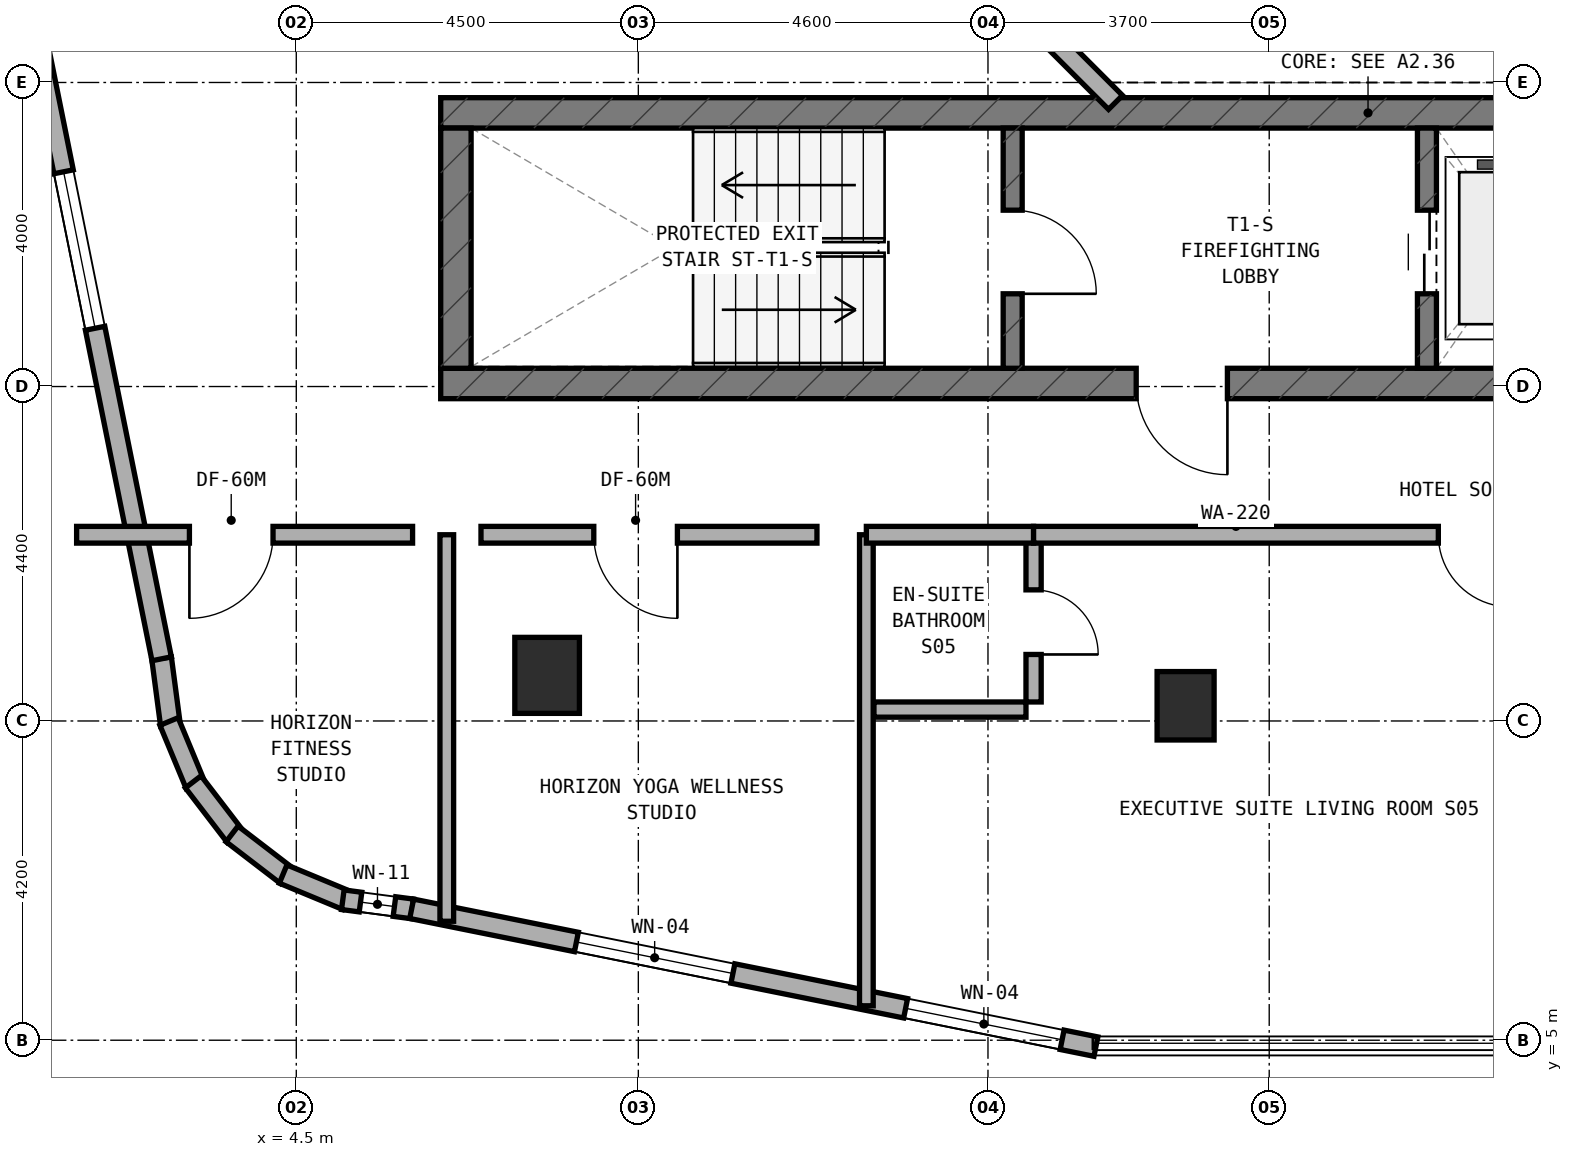
"""IFC4 building model, lengths in metres.
Left out: names, types, materials, properties, quantities, classifications, styles, units other than length and angle.
Written with IfcOpenShell. Run it as: python <this file> out.ifc"""

import sys

from ifc_helpers import new_model, si_unit, direction, frame, frame_2d, origin, origin_2d, place, context, subcontext, project, spatial, rectangle, extrude, element, fill, save


model = new_model("IFC4")
c1 = context("Model", 3, precision=1e-05, world=origin(), true_north=direction((0.0, 1.0)))
c2 = subcontext(c1, "Body", "Model", "MODEL_VIEW")
j1 = project(units=[si_unit("LENGTHUNIT", "METRE"), si_unit("PLANEANGLEUNIT", "RADIAN")], contexts=[c1])
p1 = place(None, origin())
s1 = spatial("IfcSite", under=j1, at=p1, CompositionType="ELEMENT")
p2 = place(p1, origin())
s2 = spatial("IfcBuilding", under=s1, at=p2, CompositionType="ELEMENT")
p3 = place(p2, frame((0.0, 0.0, 159.0)))
s3 = spatial("IfcBuildingStorey", under=s2, at=p3, CompositionType="ELEMENT", Elevation=159.0)
p4 = place(p3, frame((6.4, 13.64, 0.0), z_axis=(0.0, 0.0, 1.0), x_axis=(1.0, 0.0, 0.0)))
e1 = element("IfcWall", 1, at=p4, inside=s3, PredefinedType="SHEAR", context=c2, shape_type="SweptSolid", body=[
    extrude(rectangle(XDim=24.4, YDim=0.4, at=frame_2d((12.2, 0.0))), origin(), (0.0, 0.0, 1.0), 3.5),
])
p5 = place(p4, frame((9.15, 0.0, 0.0)))
e2 = element("IfcOpeningElement", 2, at=p5, cuts=e1, PredefinedType="OPENING", context=c2, shape_type="SweptSolid", body=[
    extrude(rectangle(XDim=1.2, YDim=2.15, at=frame_2d((0.6, 1.075))), frame((0.0, 0.21, 0.0), z_axis=(0.0, -1.0, 0.0), x_axis=(1.0, 0.0, 0.0)), (0.0, 0.0, 1.0), 0.42),
])
p6 = place(p4, frame((16.94, 0.0, 0.0)))
e3 = element("IfcOpeningElement", 3, at=p6, cuts=e1, PredefinedType="OPENING", context=c2, shape_type="SweptSolid", body=[
    extrude(rectangle(XDim=0.85, YDim=2.1, at=frame_2d((0.425, 1.05))), frame((0.0, 0.21, 0.0), z_axis=(0.0, -1.0, 0.0), x_axis=(1.0, 0.0, 0.0)), (0.0, 0.0, 1.0), 0.42),
])
p7 = place(p4, frame((18.783, 0.0, 0.0)))
e4 = element("IfcOpeningElement", 4, at=p7, cuts=e1, PredefinedType="OPENING", context=c2, shape_type="SweptSolid", body=[
    extrude(rectangle(XDim=1.1, YDim=2.15, at=frame_2d((0.55, 1.075))), frame((0.0, 0.21, 0.0), z_axis=(0.0, -1.0, 0.0), x_axis=(1.0, 0.0, 0.0)), (0.0, 0.0, 1.0), 0.42),
])
p8 = place(p4, frame((20.65, 0.0, 0.0)))
e5 = element("IfcOpeningElement", 5, at=p8, cuts=e1, PredefinedType="OPENING", context=c2, shape_type="SweptSolid", body=[
    extrude(rectangle(XDim=1.1, YDim=2.15, at=frame_2d((0.55, 1.075))), frame((0.0, 0.21, 0.0), z_axis=(0.0, -1.0, 0.0), x_axis=(1.0, 0.0, 0.0)), (0.0, 0.0, 1.0), 0.42),
])
p9 = place(p4, frame((22.517, 0.0, 0.0)))
e6 = element("IfcOpeningElement", 6, at=p9, cuts=e1, PredefinedType="OPENING", context=c2, shape_type="SweptSolid", body=[
    extrude(rectangle(XDim=1.1, YDim=2.15, at=frame_2d((0.55, 1.075))), frame((0.0, 0.21, 0.0), z_axis=(0.0, -1.0, 0.0), x_axis=(1.0, 0.0, 0.0)), (0.0, 0.0, 1.0), 0.42),
])
p10 = place(p3, frame((6.4, 17.2, 0.0), z_axis=(0.0, 0.0, 1.0), x_axis=(1.0, 0.0, 0.0)))
e7 = element("IfcWall", 7, at=p10, inside=s3, PredefinedType="SHEAR", context=c2, shape_type="SweptSolid", body=[
    extrude(rectangle(XDim=24.4, YDim=0.4, at=frame_2d((12.2, 0.0))), origin(), (0.0, 0.0, 1.0), 3.5),
])
p11 = place(p3, frame((6.6, 13.84, 0.0), z_axis=(0.0, 0.0, 1.0), x_axis=(0.0, 1.0, 0.0)))
e8 = element("IfcWall", 8, at=p11, inside=s3, PredefinedType="SHEAR", context=c2, shape_type="SweptSolid", body=[
    extrude(rectangle(XDim=3.16, YDim=0.4, at=frame_2d((1.58, 0.0))), origin(), (0.0, 0.0, 1.0), 3.5),
])
p12 = place(p3, frame((13.925, 13.84, 0.0), z_axis=(0.0, 0.0, 1.0), x_axis=(0.0, 1.0, 0.0)))
e9 = element("IfcWall", 9, at=p12, inside=s3, PredefinedType="STANDARD", context=c2, shape_type="SweptSolid", body=[
    extrude(rectangle(XDim=3.16, YDim=0.25, at=frame_2d((1.58, 0.0))), origin(), (0.0, 0.0, 1.0), 3.22),
])
p13 = place(p12, frame((0.98, 0.0, 0.0)))
e10 = element("IfcOpeningElement", 10, at=p13, cuts=e9, PredefinedType="OPENING", context=c2, shape_type="SweptSolid", body=[
    extrude(rectangle(XDim=1.1, YDim=2.15, at=frame_2d((0.55, 1.075))), frame((0.0, 0.135, 0.0), z_axis=(0.0, -1.0, 0.0), x_axis=(1.0, 0.0, 0.0)), (0.0, 0.0, 1.0), 0.27),
])
p14 = place(p3, frame((19.375, 13.84, 0.0), z_axis=(0.0, 0.0, 1.0), x_axis=(0.0, 1.0, 0.0)))
e11 = element("IfcWall", 11, at=p14, inside=s3, PredefinedType="STANDARD", context=c2, shape_type="SweptSolid", body=[
    extrude(rectangle(XDim=3.16, YDim=0.25, at=frame_2d((1.58, 0.0))), origin(), (0.0, 0.0, 1.0), 3.22),
])
p15 = place(p14, frame((0.98, 0.0, 0.0)))
e12 = element("IfcOpeningElement", 12, at=p15, cuts=e11, PredefinedType="OPENING", context=c2, shape_type="SweptSolid", body=[
    extrude(rectangle(XDim=1.1, YDim=2.15, at=frame_2d((0.55, 1.075))), frame((0.0, 0.135, 0.0), z_axis=(0.0, -1.0, 0.0), x_axis=(1.0, 0.0, 0.0)), (0.0, 0.0, 1.0), 0.27),
])
p16 = place(p3, frame((16.2, 9.4, 0.0), z_axis=(0.0, 0.0, 1.0), x_axis=(1.0, 0.0, 0.0)))
e13 = element("IfcColumn", 13, at=p16, inside=s3, PredefinedType="COLUMN", context=c2, shape_type="SweptSolid", body=[
    extrude(rectangle(XDim=0.75, YDim=0.9, at=origin_2d()), origin(), (0.0, 0.0, 1.0), 3.5),
])
p17 = place(p3, frame((7.8, 9.8, 0.0), z_axis=(0.0, 0.0, 1.0), x_axis=(1.0, 0.0, 0.0)))
e14 = element("IfcColumn", 14, at=p17, inside=s3, PredefinedType="COLUMN", context=c2, shape_type="SweptSolid", body=[
    extrude(rectangle(XDim=0.85, YDim=1.0, at=origin_2d()), origin(), (0.0, 0.0, 1.0), 3.5),
])
p18 = place(p3, frame((2.728, 10.025, 0.0), z_axis=(0.0, 0.0, 1.0), x_axis=(0.130953706898, -0.991388484223, 0.0)))
e15 = element("IfcWall", 15, at=p18, inside=s3, PredefinedType="STANDARD", context=c2, shape_type="SweptSolid", body=[
    extrude(rectangle(XDim=0.885, YDim=0.26, at=frame_2d((0.443, 0.0))), origin(), (0.0, 0.0, 1.0), 3.22),
])
p19 = place(p3, frame((2.826, 9.193, 0.0), z_axis=(0.0, 0.0, 1.0), x_axis=(0.383290660547, -0.923627776508, 0.0)))
e16 = element("IfcWall", 16, at=p19, inside=s3, PredefinedType="STANDARD", context=c2, shape_type="SweptSolid", body=[
    extrude(rectangle(XDim=0.903, YDim=0.26, at=frame_2d((0.452, 0.0))), origin(), (0.0, 0.0, 1.0), 3.22),
])
p20 = place(p3, frame((3.144, 8.399, 0.0), z_axis=(0.0, 0.0, 1.0), x_axis=(0.608624690463, -0.793458244748, 0.0)))
e17 = element("IfcWall", 17, at=p20, inside=s3, PredefinedType="STANDARD", context=c2, shape_type="SweptSolid", body=[
    extrude(rectangle(XDim=0.902, YDim=0.26, at=frame_2d((0.451, 0.0))), origin(), (0.0, 0.0, 1.0), 3.22),
])
p21 = place(p3, frame((3.655, 7.714, 0.0), z_axis=(0.0, 0.0, 1.0), x_axis=(0.793558456666, -0.608494022858, 0.0)))
e18 = element("IfcWall", 18, at=p21, inside=s3, PredefinedType="STANDARD", context=c2, shape_type="SweptSolid", body=[
    extrude(rectangle(XDim=0.902, YDim=0.26, at=frame_2d((0.451, 0.0))), origin(), (0.0, 0.0, 1.0), 3.22),
])
p22 = place(p3, frame((4.327, 7.186, 0.0), z_axis=(0.0, 0.0, 1.0), x_axis=(0.923683767999, -0.383155708213, 0.0)))
e19 = element("IfcWall", 19, at=p22, inside=s3, PredefinedType="STANDARD", context=c2, shape_type="SweptSolid", body=[
    extrude(rectangle(XDim=0.903, YDim=0.26, at=frame_2d((0.451, 0.0))), origin(), (0.0, 0.0, 1.0), 3.22),
])
p23 = place(p3, frame((5.112, 6.848, 0.0), z_axis=(0.0, 0.0, 1.0), x_axis=(0.991487658083, -0.130200706103, 0.0)))
e20 = element("IfcWall", 20, at=p23, inside=s3, PredefinedType="STANDARD", context=c2, shape_type="SweptSolid", body=[
    extrude(rectangle(XDim=0.921, YDim=0.26, at=frame_2d((0.46, 0.0))), origin(), (0.0, 0.0, 1.0), 3.22),
])
p24 = place(p23, frame((0.235, 0.0, 0.85)))
e21 = element("IfcOpeningElement", 21, at=p24, cuts=e20, PredefinedType="OPENING", context=c2, shape_type="SweptSolid", body=[
    extrude(rectangle(XDim=0.45, YDim=1.5, at=frame_2d((0.225, 0.75))), frame((0.0, 0.14, 0.0), z_axis=(0.0, -1.0, 0.0), x_axis=(1.0, 0.0, 0.0)), (0.0, 0.0, 1.0), 0.28),
])
p25 = place(p3, frame((6.018, 6.729, 0.0), z_axis=(0.0, 0.0, 1.0), x_axis=(0.980315963543, -0.197435082048, 0.0)))
e22 = element("IfcWall", 22, at=p25, inside=s3, PredefinedType="STANDARD", context=c2, shape_type="SweptSolid", body=[
    extrude(rectangle(XDim=9.183, YDim=0.26, at=frame_2d((4.591, 0.0))), origin(), (0.0, 0.0, 1.0), 3.22),
])
p26 = place(p25, frame((2.211, 0.0, 0.85)))
e23 = element("IfcOpeningElement", 23, at=p26, cuts=e22, PredefinedType="OPENING", context=c2, shape_type="SweptSolid", body=[
    extrude(rectangle(XDim=2.1, YDim=1.5, at=frame_2d((1.05, 0.75))), frame((0.0, 0.14, 0.0), z_axis=(0.0, -1.0, 0.0), x_axis=(1.0, 0.0, 0.0)), (0.0, 0.0, 1.0), 0.28),
])
p27 = place(p25, frame((6.629, 0.0, 0.85)))
e24 = element("IfcOpeningElement", 24, at=p27, cuts=e22, PredefinedType="OPENING", context=c2, shape_type="SweptSolid", body=[
    extrude(rectangle(XDim=2.1, YDim=1.5, at=frame_2d((1.05, 0.75))), frame((0.0, 0.14, 0.0), z_axis=(0.0, -1.0, 0.0), x_axis=(1.0, 0.0, 0.0)), (0.0, 0.0, 1.0), 0.28),
])
p28 = place(p3, frame((0.916, 19.02, 0.0), z_axis=(0.0, 0.0, 1.0), x_axis=(0.197435082048, -0.980315963543, 0.0)))
e25 = element("IfcWall", 25, at=p28, inside=s3, PredefinedType="STANDARD", context=c2, shape_type="SweptSolid", body=[
    extrude(rectangle(XDim=9.183, YDim=0.26, at=frame_2d((4.591, 0.0))), origin(), (0.0, 0.0, 1.0), 3.22),
])
p29 = place(p28, frame((2.647, 0.0, 0.85)))
e26 = element("IfcOpeningElement", 26, at=p29, cuts=e25, PredefinedType="OPENING", context=c2, shape_type="SweptSolid", body=[
    extrude(rectangle(XDim=2.1, YDim=1.5, at=frame_2d((1.05, 0.75))), frame((0.0, 0.14, 0.0), z_axis=(0.0, -1.0, 0.0), x_axis=(1.0, 0.0, 0.0)), (0.0, 0.0, 1.0), 0.28),
])
p30 = place(p3, frame((13.444, 19.172, 0.0), z_axis=(0.0, 0.0, 1.0), x_axis=(0.707059717605, -0.707153841636, 0.0)))
e27 = element("IfcWall", 27, at=p30, inside=s3, PredefinedType="STANDARD", context=c2, shape_type="SweptSolid", body=[
    extrude(rectangle(XDim=2.594, YDim=0.26, at=frame_2d((1.297, 0.0))), origin(), (0.0, 0.0, 1.0), 3.22),
])
p31 = place(p3, frame((6.48, 6.565, 0.0), z_axis=(0.0, 0.0, 1.0), x_axis=(0.0, 1.0, 0.0)))
e28 = element("IfcWall", 28, at=p31, inside=s3, PredefinedType="SOLIDWALL", context=c2, shape_type="SweptSolid", body=[
    extrude(rectangle(XDim=5.085, YDim=0.18, at=frame_2d((2.542, 0.0))), origin(), (0.0, 0.0, 1.0), 3.22),
])
p32 = place(p3, frame((1.61, 11.65, 0.0), z_axis=(0.0, 0.0, 1.0), x_axis=(1.0, 0.0, 0.0)))
e29 = element("IfcWall", 29, at=p32, inside=s3, PredefinedType="SOLIDWALL", context=c2, shape_type="SweptSolid", body=[
    extrude(rectangle(XDim=4.42, YDim=0.22, at=frame_2d((2.21, 0.0))), origin(), (0.0, 0.0, 1.0), 3.22),
])
p33 = place(p32, frame((1.484, 0.0, 0.0)))
e30 = element("IfcOpeningElement", 30, at=p33, cuts=e29, PredefinedType="OPENING", context=c2, shape_type="SweptSolid", body=[
    extrude(rectangle(XDim=1.1, YDim=2.1, at=frame_2d((0.55, 1.05))), frame((0.0, 0.12, 0.0), z_axis=(0.0, -1.0, 0.0), x_axis=(1.0, 0.0, 0.0)), (0.0, 0.0, 1.0), 0.24),
])
p34 = place(p3, frame((6.93, 11.65, 0.0), z_axis=(0.0, 0.0, 1.0), x_axis=(1.0, 0.0, 0.0)))
e31 = element("IfcWall", 31, at=p34, inside=s3, PredefinedType="SOLIDWALL", context=c2, shape_type="SweptSolid", body=[
    extrude(rectangle(XDim=4.42, YDim=0.22, at=frame_2d((2.21, 0.0))), origin(), (0.0, 0.0, 1.0), 2.795),
])
p35 = place(p34, frame((1.484, 0.0, 0.0)))
e32 = element("IfcOpeningElement", 32, at=p35, cuts=e31, PredefinedType="OPENING", context=c2, shape_type="SweptSolid", body=[
    extrude(rectangle(XDim=1.1, YDim=2.1, at=frame_2d((0.55, 1.05))), frame((0.0, 0.12, 0.0), z_axis=(0.0, -1.0, 0.0), x_axis=(1.0, 0.0, 0.0)), (0.0, 0.0, 1.0), 0.24),
])
p36 = place(p3, frame((12.0, 5.453, 0.0), z_axis=(0.0, 0.0, 1.0), x_axis=(0.0, 1.0, 0.0)))
e33 = element("IfcWall", 33, at=p36, inside=s3, PredefinedType="SOLIDWALL", context=c2, shape_type="SweptSolid", body=[
    extrude(rectangle(XDim=6.197, YDim=0.18, at=frame_2d((3.099, 0.0))), origin(), (0.0, 0.0, 1.0), 2.835),
])
p37 = place(p3, frame((14.2, 9.45, 0.0), z_axis=(0.0, 0.0, 1.0), x_axis=(0.0, 1.0, 0.0)))
e34 = element("IfcWall", 34, at=p37, inside=s3, PredefinedType="PLUMBINGWALL", context=c2, shape_type="SweptSolid", body=[
    extrude(rectangle(XDim=2.1, YDim=0.2, at=frame_2d((1.05, 0.0))), origin(), (0.0, 0.0, 1.0), 2.835),
])
p38 = place(p37, frame((0.625, 0.0, 0.0)))
e35 = element("IfcOpeningElement", 35, at=p38, cuts=e34, PredefinedType="OPENING", context=c2, shape_type="SweptSolid", body=[
    extrude(rectangle(XDim=0.85, YDim=2.1, at=frame_2d((0.425, 1.05))), frame((0.0, 0.11, 0.0), z_axis=(0.0, -1.0, 0.0), x_axis=(1.0, 0.0, 0.0)), (0.0, 0.0, 1.0), 0.22),
])
p39 = place(p3, frame((12.1, 9.35, 0.0), z_axis=(0.0, 0.0, 1.0), x_axis=(1.0, 0.0, 0.0)))
e36 = element("IfcWall", 36, at=p39, inside=s3, PredefinedType="PLUMBINGWALL", context=c2, shape_type="SweptSolid", body=[
    extrude(rectangle(XDim=2.0, YDim=0.2, at=frame_2d((1.0, 0.0))), origin(), (0.0, 0.0, 1.0), 2.835),
])
p40 = place(p3, frame((12.0, 11.65, 0.0), z_axis=(0.0, 0.0, 1.0), x_axis=(1.0, 0.0, 0.0)))
e37 = element("IfcWall", 37, at=p40, inside=s3, PredefinedType="SOLIDWALL", context=c2, shape_type="SweptSolid", body=[
    extrude(rectangle(XDim=2.2, YDim=0.22, at=frame_2d((1.1, 0.0))), origin(), (0.0, 0.0, 1.0), 3.22),
])
p41 = place(p3, frame((14.2, 11.65, 0.0), z_axis=(0.0, 0.0, 1.0), x_axis=(1.0, 0.0, 0.0)))
e38 = element("IfcWall", 38, at=p41, inside=s3, PredefinedType="SOLIDWALL", context=c2, shape_type="SweptSolid", body=[
    extrude(rectangle(XDim=11.6, YDim=0.22, at=frame_2d((5.8, 0.0))), origin(), (0.0, 0.0, 1.0), 2.795),
])
p42 = place(p41, frame((5.325, 0.0, 0.0)))
e39 = element("IfcOpeningElement", 39, at=p42, cuts=e38, PredefinedType="OPENING", context=c2, shape_type="SweptSolid", body=[
    extrude(rectangle(XDim=0.95, YDim=2.1, at=frame_2d((0.475, 1.05))), frame((0.0, 0.12, 0.0), z_axis=(0.0, -1.0, 0.0), x_axis=(1.0, 0.0, 0.0)), (0.0, 0.0, 1.0), 0.24),
])
p43 = place(p26, origin())
e40 = element("IfcWindow", 40, at=p43, inside=s3, PartitioningType="SINGLE_PANEL", PredefinedType="WINDOW", context=c2, shape_type="SweptSolid", body=[
    extrude(rectangle(XDim=2.1, YDim=1.5, at=frame_2d((1.05, 0.75))), frame((0.0, 0.03, 0.0), z_axis=(0.0, -1.0, 0.0), x_axis=(1.0, 0.0, 0.0)), (0.0, 0.0, 1.0), 0.06),
])
fill(e23, e40)
p44 = place(p27, origin())
e41 = element("IfcWindow", 41, at=p44, inside=s3, PartitioningType="SINGLE_PANEL", PredefinedType="WINDOW", context=c2, shape_type="SweptSolid", body=[
    extrude(rectangle(XDim=2.1, YDim=1.5, at=frame_2d((1.05, 0.75))), frame((0.0, 0.03, 0.0), z_axis=(0.0, -1.0, 0.0), x_axis=(1.0, 0.0, 0.0)), (0.0, 0.0, 1.0), 0.06),
])
fill(e24, e41)
p45 = place(p29, origin())
e42 = element("IfcWindow", 42, at=p45, inside=s3, PartitioningType="SINGLE_PANEL", PredefinedType="WINDOW", context=c2, shape_type="SweptSolid", body=[
    extrude(rectangle(XDim=2.1, YDim=1.5, at=frame_2d((1.05, 0.75))), frame((0.0, 0.03, 0.0), z_axis=(0.0, -1.0, 0.0), x_axis=(1.0, 0.0, 0.0)), (0.0, 0.0, 1.0), 0.06),
])
fill(e26, e42)
p46 = place(p24, origin())
e43 = element("IfcWindow", 43, at=p46, inside=s3, PartitioningType="SINGLE_PANEL", PredefinedType="WINDOW", context=c2, shape_type="SweptSolid", body=[
    extrude(rectangle(XDim=0.45, YDim=1.5, at=frame_2d((0.225, 0.75))), frame((0.0, 0.03, 0.0), z_axis=(0.0, -1.0, 0.0), x_axis=(1.0, 0.0, 0.0)), (0.0, 0.0, 1.0), 0.06),
])
fill(e21, e43)
p47 = place(p13, frame((1.1, 0.0, 0.0), z_axis=(0.0, 0.0, 1.0), x_axis=(-1.0, 0.0, 0.0)))
e44 = element("IfcDoor", 44, at=p47, inside=s3, OperationType="SINGLE_SWING_RIGHT", PredefinedType="DOOR", context=c2, shape_type="SweptSolid", body=[
    extrude(rectangle(XDim=1.1, YDim=2.15, at=frame_2d((0.55, 1.075))), frame((0.0, 0.025, 0.0), z_axis=(0.0, -1.0, 0.0), x_axis=(1.0, 0.0, 0.0)), (0.0, 0.0, 1.0), 0.05),
])
fill(e10, e44)
p48 = place(p5, frame((1.2, 0.0, 0.0), z_axis=(0.0, 0.0, 1.0), x_axis=(-1.0, 0.0, 0.0)))
e45 = element("IfcDoor", 45, at=p48, inside=s3, OperationType="SINGLE_SWING_LEFT", PredefinedType="DOOR", context=c2, shape_type="SweptSolid", body=[
    extrude(rectangle(XDim=1.2, YDim=2.15, at=frame_2d((0.6, 1.075))), frame((0.0, 0.025, 0.0), z_axis=(0.0, -1.0, 0.0), x_axis=(1.0, 0.0, 0.0)), (0.0, 0.0, 1.0), 0.05),
])
fill(e2, e45)
p49 = place(p15, origin())
e46 = element("IfcDoor", 46, at=p49, inside=s3, OperationType="DOUBLE_DOOR_SLIDING", PredefinedType="DOOR", context=c2, shape_type="SweptSolid", body=[
    extrude(rectangle(XDim=1.1, YDim=2.15, at=frame_2d((0.55, 1.075))), frame((0.0, 0.025, 0.0), z_axis=(0.0, -1.0, 0.0), x_axis=(1.0, 0.0, 0.0)), (0.0, 0.0, 1.0), 0.05),
])
fill(e12, e46)
p50 = place(p33, frame((1.1, 0.0, 0.0), z_axis=(0.0, 0.0, 1.0), x_axis=(-1.0, 0.0, 0.0)))
e47 = element("IfcDoor", 47, at=p50, inside=s3, OperationType="SINGLE_SWING_RIGHT", PredefinedType="DOOR", context=c2, shape_type="SweptSolid", body=[
    extrude(rectangle(XDim=1.1, YDim=2.1, at=frame_2d((0.55, 1.05))), frame((0.0, 0.025, 0.0), z_axis=(0.0, -1.0, 0.0), x_axis=(1.0, 0.0, 0.0)), (0.0, 0.0, 1.0), 0.05),
])
fill(e30, e47)
p51 = place(p35, frame((1.1, 0.0, 0.0), z_axis=(0.0, 0.0, 1.0), x_axis=(-1.0, 0.0, 0.0)))
e48 = element("IfcDoor", 48, at=p51, inside=s3, OperationType="SINGLE_SWING_LEFT", PredefinedType="DOOR", context=c2, shape_type="SweptSolid", body=[
    extrude(rectangle(XDim=1.1, YDim=2.1, at=frame_2d((0.55, 1.05))), frame((0.0, 0.025, 0.0), z_axis=(0.0, -1.0, 0.0), x_axis=(1.0, 0.0, 0.0)), (0.0, 0.0, 1.0), 0.05),
])
fill(e32, e48)
p52 = place(p38, frame((0.85, 0.0, 0.0), z_axis=(0.0, 0.0, 1.0), x_axis=(-1.0, 0.0, 0.0)))
e49 = element("IfcDoor", 49, at=p52, inside=s3, OperationType="SINGLE_SWING_RIGHT", PredefinedType="DOOR", context=c2, shape_type="SweptSolid", body=[
    extrude(rectangle(XDim=0.85, YDim=2.1, at=frame_2d((0.425, 1.05))), frame((0.0, 0.025, 0.0), z_axis=(0.0, -1.0, 0.0), x_axis=(1.0, 0.0, 0.0)), (0.0, 0.0, 1.0), 0.05),
])
fill(e35, e49)
p53 = place(p42, frame((0.95, 0.0, 0.0), z_axis=(0.0, 0.0, 1.0), x_axis=(-1.0, 0.0, 0.0)))
e50 = element("IfcDoor", 50, at=p53, inside=s3, OperationType="SINGLE_SWING_LEFT", PredefinedType="DOOR", context=c2, shape_type="SweptSolid", body=[
    extrude(rectangle(XDim=0.95, YDim=2.1, at=frame_2d((0.475, 1.05))), frame((0.0, 0.025, 0.0), z_axis=(0.0, -1.0, 0.0), x_axis=(1.0, 0.0, 0.0)), (0.0, 0.0, 1.0), 0.05),
])
fill(e39, e50)
save(model, sys.argv[1])
